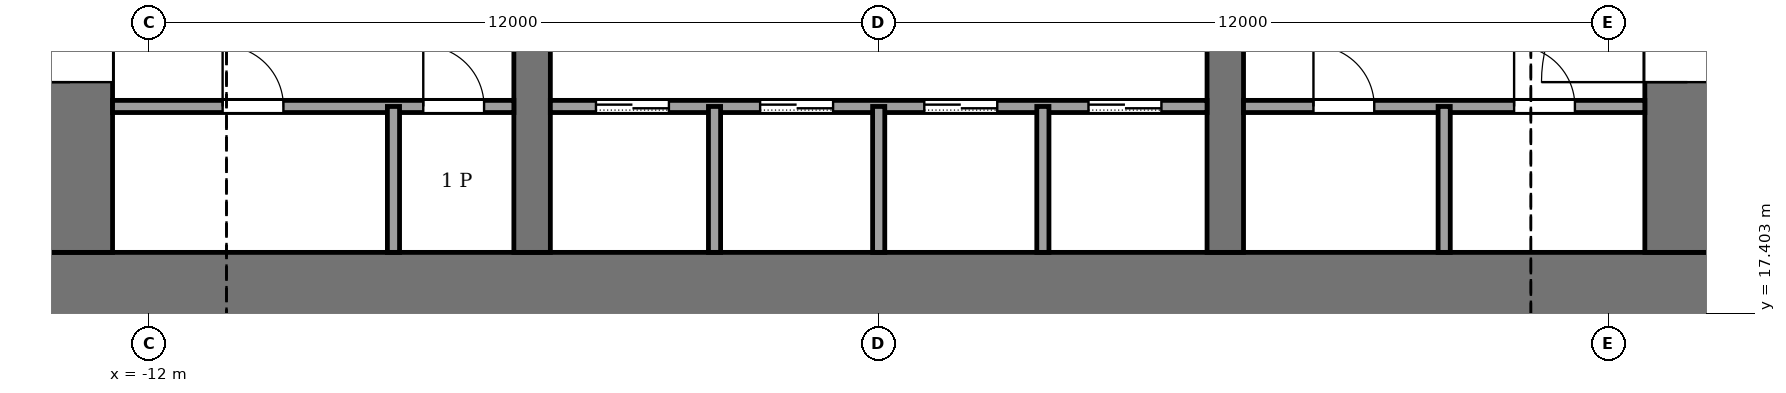
"""IFC4 building model, lengths in metres.
Left out: names, types, materials, properties, quantities, classifications, styles, units other than length and angle.
Written with IfcOpenShell. Run it as: python <this file> out.ifc"""

import sys

from ifc_helpers import new_model, si_unit, direction, frame, frame_2d, origin, place, context, subcontext, project, spatial, rectangle, extrude, element, fill, save


model = new_model("IFC4")
c1 = context("Model", 3, precision=1e-05, world=origin(), true_north=direction((0.0, 1.0)))
c2 = subcontext(c1, "Body", "Model", "MODEL_VIEW")
j1 = project(units=[si_unit("LENGTHUNIT", "METRE"), si_unit("PLANEANGLEUNIT", "RADIAN")], contexts=[c1])
p1 = place(None, origin())
s1 = spatial("IfcSite", under=j1, at=p1, CompositionType="ELEMENT")
p2 = place(p1, origin())
s2 = spatial("IfcBuilding", under=s1, at=p2, CompositionType="ELEMENT")
p3 = place(p2, frame((0.0, 0.0, 34.0)))
s3 = spatial("IfcBuildingStorey", under=s2, at=p3, CompositionType="ELEMENT", Elevation=34.0)
p4 = place(p3, frame((-14.0, 17.7, -0.13), z_axis=(0.0, 0.0, 1.0), x_axis=(1.0, 0.0, 0.0)))
e1 = element("IfcWall", 1, at=p4, inside=s3, PredefinedType="SHEAR", context=c2, shape_type="SweptSolid", body=[
    extrude(rectangle(XDim=28.0, YDim=1.4, at=frame_2d((14.0, 0.0))), origin(), (0.0, 0.0, 1.0), 4.0),
])
p5 = place(p3, frame((-13.3, 18.4, -0.13), z_axis=(0.0, 0.0, 1.0), x_axis=(0.0, 1.0, 0.0)))
e2 = element("IfcWall", 2, at=p5, inside=s3, PredefinedType="SHEAR", context=c2, shape_type="SweptSolid", body=[
    extrude(rectangle(XDim=19.2, YDim=1.4, at=frame_2d((9.6, 0.0))), origin(), (0.0, 0.0, 1.0), 4.0),
])
p6 = place(p5, frame((2.8, 0.0, 0.13)))
e3 = element("IfcOpeningElement", 3, at=p6, cuts=e2, PredefinedType="OPENING", context=c2, shape_type="SweptSolid", body=[
    extrude(rectangle(XDim=2.4, YDim=2.4, at=frame_2d((1.2, 1.2))), frame((0.0, 0.71, 0.0), z_axis=(0.0, -1.0, 0.0), x_axis=(1.0, 0.0, 0.0)), (0.0, 0.0, 1.0), 1.42),
])
p7 = place(p5, frame((13.4, 0.0, 0.13)))
e4 = element("IfcOpeningElement", 4, at=p7, cuts=e2, PredefinedType="OPENING", context=c2, shape_type="SweptSolid", body=[
    extrude(rectangle(XDim=1.4, YDim=2.2, at=frame_2d((0.7, 1.1))), frame((0.0, 0.71, 0.0), z_axis=(0.0, -1.0, 0.0), x_axis=(1.0, 0.0, 0.0)), (0.0, 0.0, 1.0), 1.42),
])
p8 = place(p3, frame((13.3, 18.4, -0.13), z_axis=(0.0, 0.0, 1.0), x_axis=(0.0, 1.0, 0.0)))
e5 = element("IfcWall", 5, at=p8, inside=s3, PredefinedType="SHEAR", context=c2, shape_type="SweptSolid", body=[
    extrude(rectangle(XDim=19.2, YDim=1.4, at=frame_2d((9.6, 0.0))), origin(), (0.0, 0.0, 1.0), 4.0),
])
p9 = place(p8, frame((2.8, 0.0, 0.13)))
e6 = element("IfcOpeningElement", 6, at=p9, cuts=e5, PredefinedType="OPENING", context=c2, shape_type="SweptSolid", body=[
    extrude(rectangle(XDim=2.4, YDim=2.4, at=frame_2d((1.2, 1.2))), frame((0.0, 0.71, 0.0), z_axis=(0.0, -1.0, 0.0), x_axis=(1.0, 0.0, 0.0)), (0.0, 0.0, 1.0), 1.42),
])
p10 = place(p8, frame((13.3, 0.0, 0.13)))
e7 = element("IfcOpeningElement", 7, at=p10, cuts=e5, PredefinedType="OPENING", context=c2, shape_type="SweptSolid", body=[
    extrude(rectangle(XDim=2.4, YDim=2.4, at=frame_2d((1.2, 1.2))), frame((0.0, 0.71, 0.0), z_axis=(0.0, -1.0, 0.0), x_axis=(1.0, 0.0, 0.0)), (0.0, 0.0, 1.0), 1.42),
])
p11 = place(p3, frame((-5.7, 18.4, -0.13), z_axis=(0.0, 0.0, 1.0), x_axis=(0.0, 1.0, 0.0)))
e8 = element("IfcWall", 8, at=p11, inside=s3, PredefinedType="SHEAR", context=c2, shape_type="SweptSolid", body=[
    extrude(rectangle(XDim=19.2, YDim=0.6, at=frame_2d((9.6, 0.0))), origin(), (0.0, 0.0, 1.0), 4.0),
])
p12 = place(p11, frame((8.35, 0.0, 0.13)))
e9 = element("IfcOpeningElement", 9, at=p12, cuts=e8, PredefinedType="OPENING", context=c2, shape_type="SweptSolid", body=[
    extrude(rectangle(XDim=0.9, YDim=2.1, at=frame_2d((0.45, 1.05))), frame((0.0, 0.31, 0.0), z_axis=(0.0, -1.0, 0.0), x_axis=(1.0, 0.0, 0.0)), (0.0, 0.0, 1.0), 0.62),
])
p13 = place(p3, frame((5.7, 18.4, -0.13), z_axis=(0.0, 0.0, 1.0), x_axis=(0.0, 1.0, 0.0)))
e10 = element("IfcWall", 10, at=p13, inside=s3, PredefinedType="SHEAR", context=c2, shape_type="SweptSolid", body=[
    extrude(rectangle(XDim=19.2, YDim=0.6, at=frame_2d((9.6, 0.0))), origin(), (0.0, 0.0, 1.0), 4.0),
])
p14 = place(p13, frame((8.35, 0.0, 0.13)))
e11 = element("IfcOpeningElement", 11, at=p14, cuts=e10, PredefinedType="OPENING", context=c2, shape_type="SweptSolid", body=[
    extrude(rectangle(XDim=0.9, YDim=2.1, at=frame_2d((0.45, 1.05))), frame((0.0, 0.31, 0.0), z_axis=(0.0, -1.0, 0.0), x_axis=(1.0, 0.0, 0.0)), (0.0, 0.0, 1.0), 0.62),
])
p15 = place(p13, frame((13.3, 0.0, 0.13)))
e12 = element("IfcOpeningElement", 12, at=p15, cuts=e10, PredefinedType="OPENING", context=c2, shape_type="SweptSolid", body=[
    extrude(rectangle(XDim=2.4, YDim=2.4, at=frame_2d((1.2, 1.2))), frame((0.0, 0.31, 0.0), z_axis=(0.0, -1.0, 0.0), x_axis=(1.0, 0.0, 0.0)), (0.0, 0.0, 1.0), 0.62),
])
p16 = place(p3, frame((-12.6, 20.8, 0.0), z_axis=(0.0, 0.0, 1.0), x_axis=(1.0, 0.0, 0.0)))
e13 = element("IfcWall", 13, at=p16, inside=s3, PredefinedType="PARTITIONING", context=c2, shape_type="SweptSolid", body=[
    extrude(rectangle(XDim=6.6, YDim=0.2, at=frame_2d((3.3, 0.0))), origin(), (0.0, 0.0, 1.0), 3.87),
])
p17 = place(p16, frame((1.81, 0.0, 0.0)))
e14 = element("IfcOpeningElement", 14, at=p17, cuts=e13, PredefinedType="OPENING", context=c2, shape_type="SweptSolid", body=[
    extrude(rectangle(XDim=1.0, YDim=2.1, at=frame_2d((0.5, 1.05))), frame((0.0, 0.11, 0.0), z_axis=(0.0, -1.0, 0.0), x_axis=(1.0, 0.0, 0.0)), (0.0, 0.0, 1.0), 0.22),
])
p18 = place(p16, frame((5.11, 0.0, 0.0)))
e15 = element("IfcOpeningElement", 15, at=p18, cuts=e13, PredefinedType="OPENING", context=c2, shape_type="SweptSolid", body=[
    extrude(rectangle(XDim=1.0, YDim=2.1, at=frame_2d((0.5, 1.05))), frame((0.0, 0.11, 0.0), z_axis=(0.0, -1.0, 0.0), x_axis=(1.0, 0.0, 0.0)), (0.0, 0.0, 1.0), 0.22),
])
p19 = place(p3, frame((-5.4, 20.8, 0.0), z_axis=(0.0, 0.0, 1.0), x_axis=(1.0, 0.0, 0.0)))
e16 = element("IfcWall", 16, at=p19, inside=s3, PredefinedType="PARTITIONING", context=c2, shape_type="SweptSolid", body=[
    extrude(rectangle(XDim=10.8, YDim=0.2, at=frame_2d((5.4, 0.0))), origin(), (0.0, 0.0, 1.0), 3.87),
])
p20 = place(p19, frame((0.75, 0.0, 0.0)))
e17 = element("IfcOpeningElement", 17, at=p20, cuts=e16, PredefinedType="OPENING", context=c2, shape_type="SweptSolid", body=[
    extrude(rectangle(XDim=1.2, YDim=2.2, at=frame_2d((0.6, 1.1))), frame((0.0, 0.11, 0.0), z_axis=(0.0, -1.0, 0.0), x_axis=(1.0, 0.0, 0.0)), (0.0, 0.0, 1.0), 0.22),
])
p21 = place(p19, frame((3.45, 0.0, 0.0)))
e18 = element("IfcOpeningElement", 18, at=p21, cuts=e16, PredefinedType="OPENING", context=c2, shape_type="SweptSolid", body=[
    extrude(rectangle(XDim=1.2, YDim=2.2, at=frame_2d((0.6, 1.1))), frame((0.0, 0.11, 0.0), z_axis=(0.0, -1.0, 0.0), x_axis=(1.0, 0.0, 0.0)), (0.0, 0.0, 1.0), 0.22),
])
p22 = place(p19, frame((6.15, 0.0, 0.0)))
e19 = element("IfcOpeningElement", 19, at=p22, cuts=e16, PredefinedType="OPENING", context=c2, shape_type="SweptSolid", body=[
    extrude(rectangle(XDim=1.2, YDim=2.2, at=frame_2d((0.6, 1.1))), frame((0.0, 0.11, 0.0), z_axis=(0.0, -1.0, 0.0), x_axis=(1.0, 0.0, 0.0)), (0.0, 0.0, 1.0), 0.22),
])
p23 = place(p19, frame((8.85, 0.0, 0.0)))
e20 = element("IfcOpeningElement", 20, at=p23, cuts=e16, PredefinedType="OPENING", context=c2, shape_type="SweptSolid", body=[
    extrude(rectangle(XDim=1.2, YDim=2.2, at=frame_2d((0.6, 1.1))), frame((0.0, 0.11, 0.0), z_axis=(0.0, -1.0, 0.0), x_axis=(1.0, 0.0, 0.0)), (0.0, 0.0, 1.0), 0.22),
])
p24 = place(p3, frame((6.0, 20.8, 0.0), z_axis=(0.0, 0.0, 1.0), x_axis=(1.0, 0.0, 0.0)))
e21 = element("IfcWall", 21, at=p24, inside=s3, PredefinedType="PARTITIONING", context=c2, shape_type="SweptSolid", body=[
    extrude(rectangle(XDim=6.6, YDim=0.2, at=frame_2d((3.3, 0.0))), origin(), (0.0, 0.0, 1.0), 3.87),
])
p25 = place(p24, frame((1.15, 0.0, 0.0)))
e22 = element("IfcOpeningElement", 22, at=p25, cuts=e21, PredefinedType="OPENING", context=c2, shape_type="SweptSolid", body=[
    extrude(rectangle(XDim=1.0, YDim=2.1, at=frame_2d((0.5, 1.05))), frame((0.0, 0.11, 0.0), z_axis=(0.0, -1.0, 0.0), x_axis=(1.0, 0.0, 0.0)), (0.0, 0.0, 1.0), 0.22),
])
p26 = place(p24, frame((4.45, 0.0, 0.0)))
e23 = element("IfcOpeningElement", 23, at=p26, cuts=e21, PredefinedType="OPENING", context=c2, shape_type="SweptSolid", body=[
    extrude(rectangle(XDim=1.0, YDim=2.1, at=frame_2d((0.5, 1.05))), frame((0.0, 0.11, 0.0), z_axis=(0.0, -1.0, 0.0), x_axis=(1.0, 0.0, 0.0)), (0.0, 0.0, 1.0), 0.22),
])
for number, where, z_axis, x_axis in (
    (24, (-7.98, 18.4, 0.0), (0.0, 0.0, 1.0), (0.0, 1.0, 0.0)),
    (25, (-2.7, 18.4, 0.0), (0.0, 0.0, 1.0), (0.0, 1.0, 0.0)),
    (26, (0.0, 18.4, 0.0), (0.0, 0.0, 1.0), (0.0, 1.0, 0.0)),
    (27, (2.7, 18.4, 0.0), (0.0, 0.0, 1.0), (0.0, 1.0, 0.0)),
    (28, (9.3, 18.4, 0.0), (0.0, 0.0, 1.0), (0.0, 1.0, 0.0)),
):
    element("IfcWall", number, at=place(p3, frame(where, z_axis=z_axis, x_axis=x_axis)), inside=s3, PredefinedType="PARTITIONING", context=c2, shape_type="SweptSolid", body=[
        extrude(rectangle(XDim=2.4, YDim=0.2, at=frame_2d((1.2, 0.0))), origin(), (0.0, 0.0, 1.0), 3.87),
    ])
p27 = place(p20, origin())
e29 = element("IfcDoor", 29, at=p27, inside=s3, OperationType="SLIDING_TO_LEFT", PredefinedType="DOOR", context=c2, shape_type="SweptSolid", body=[
    extrude(rectangle(XDim=1.2, YDim=2.2, at=frame_2d((0.6, 1.1))), frame((0.0, 0.025, 0.0), z_axis=(0.0, -1.0, 0.0), x_axis=(1.0, 0.0, 0.0)), (0.0, 0.0, 1.0), 0.05),
])
fill(e17, e29)
p28 = place(p21, origin())
e30 = element("IfcDoor", 30, at=p28, inside=s3, OperationType="SLIDING_TO_LEFT", PredefinedType="DOOR", context=c2, shape_type="SweptSolid", body=[
    extrude(rectangle(XDim=1.2, YDim=2.2, at=frame_2d((0.6, 1.1))), frame((0.0, 0.025, 0.0), z_axis=(0.0, -1.0, 0.0), x_axis=(1.0, 0.0, 0.0)), (0.0, 0.0, 1.0), 0.05),
])
fill(e18, e30)
p29 = place(p22, origin())
e31 = element("IfcDoor", 31, at=p29, inside=s3, OperationType="SLIDING_TO_LEFT", PredefinedType="DOOR", context=c2, shape_type="SweptSolid", body=[
    extrude(rectangle(XDim=1.2, YDim=2.2, at=frame_2d((0.6, 1.1))), frame((0.0, 0.025, 0.0), z_axis=(0.0, -1.0, 0.0), x_axis=(1.0, 0.0, 0.0)), (0.0, 0.0, 1.0), 0.05),
])
fill(e19, e31)
p30 = place(p23, origin())
e32 = element("IfcDoor", 32, at=p30, inside=s3, OperationType="SLIDING_TO_LEFT", PredefinedType="DOOR", context=c2, shape_type="SweptSolid", body=[
    extrude(rectangle(XDim=1.2, YDim=2.2, at=frame_2d((0.6, 1.1))), frame((0.0, 0.025, 0.0), z_axis=(0.0, -1.0, 0.0), x_axis=(1.0, 0.0, 0.0)), (0.0, 0.0, 1.0), 0.05),
])
fill(e20, e32)
p31 = place(p17, origin())
e33 = element("IfcDoor", 33, at=p31, inside=s3, OperationType="SINGLE_SWING_LEFT", PredefinedType="DOOR", context=c2, shape_type="SweptSolid", body=[
    extrude(rectangle(XDim=1.0, YDim=2.1, at=frame_2d((0.5, 1.05))), frame((0.0, 0.025, 0.0), z_axis=(0.0, -1.0, 0.0), x_axis=(1.0, 0.0, 0.0)), (0.0, 0.0, 1.0), 0.05),
])
fill(e14, e33)
p32 = place(p18, origin())
e34 = element("IfcDoor", 34, at=p32, inside=s3, OperationType="SINGLE_SWING_LEFT", PredefinedType="DOOR", context=c2, shape_type="SweptSolid", body=[
    extrude(rectangle(XDim=1.0, YDim=2.1, at=frame_2d((0.5, 1.05))), frame((0.0, 0.025, 0.0), z_axis=(0.0, -1.0, 0.0), x_axis=(1.0, 0.0, 0.0)), (0.0, 0.0, 1.0), 0.05),
])
fill(e15, e34)
p33 = place(p25, origin())
e35 = element("IfcDoor", 35, at=p33, inside=s3, OperationType="SINGLE_SWING_LEFT", PredefinedType="DOOR", context=c2, shape_type="SweptSolid", body=[
    extrude(rectangle(XDim=1.0, YDim=2.1, at=frame_2d((0.5, 1.05))), frame((0.0, 0.025, 0.0), z_axis=(0.0, -1.0, 0.0), x_axis=(1.0, 0.0, 0.0)), (0.0, 0.0, 1.0), 0.05),
])
fill(e22, e35)
p34 = place(p26, origin())
e36 = element("IfcDoor", 36, at=p34, inside=s3, OperationType="SINGLE_SWING_LEFT", PredefinedType="DOOR", context=c2, shape_type="SweptSolid", body=[
    extrude(rectangle(XDim=1.0, YDim=2.1, at=frame_2d((0.5, 1.05))), frame((0.0, 0.025, 0.0), z_axis=(0.0, -1.0, 0.0), x_axis=(1.0, 0.0, 0.0)), (0.0, 0.0, 1.0), 0.05),
])
fill(e23, e36)
p35 = place(p6, origin())
e37 = element("IfcDoor", 37, at=p35, inside=s3, OperationType="DOUBLE_DOOR_SINGLE_SWING", PredefinedType="DOOR", context=c2, shape_type="SweptSolid", body=[
    extrude(rectangle(XDim=2.4, YDim=2.4, at=frame_2d((1.2, 1.2))), frame((0.0, 0.025, 0.0), z_axis=(0.0, -1.0, 0.0), x_axis=(1.0, 0.0, 0.0)), (0.0, 0.0, 1.0), 0.05),
])
fill(e3, e37)
p36 = place(p9, origin())
e38 = element("IfcDoor", 38, at=p36, inside=s3, OperationType="DOUBLE_DOOR_SINGLE_SWING", PredefinedType="DOOR", context=c2, shape_type="SweptSolid", body=[
    extrude(rectangle(XDim=2.4, YDim=2.4, at=frame_2d((1.2, 1.2))), frame((0.0, 0.025, 0.0), z_axis=(0.0, -1.0, 0.0), x_axis=(1.0, 0.0, 0.0)), (0.0, 0.0, 1.0), 0.05),
])
fill(e6, e38)
save(model, sys.argv[1])
